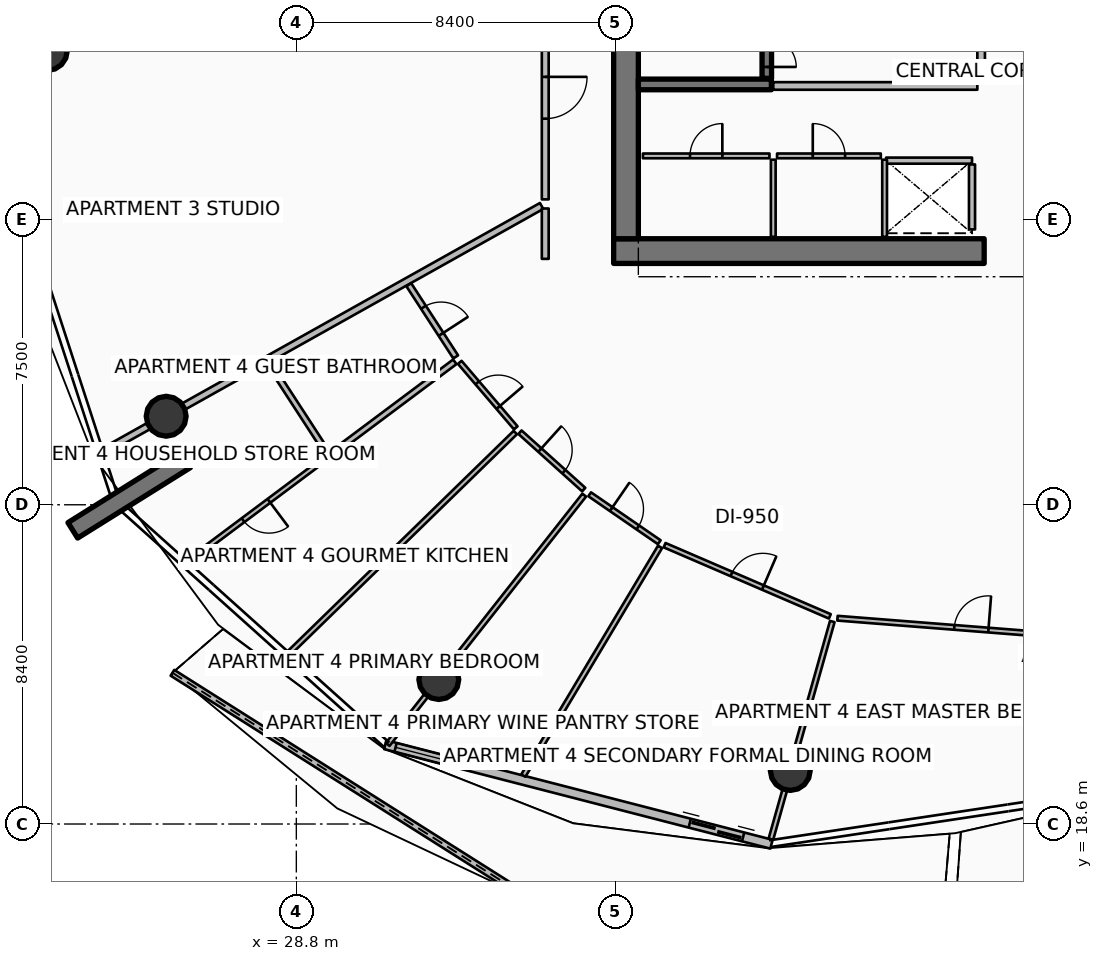
"""IFC4 building model, lengths in metres.
Left out: names, types, materials, properties, quantities, classifications, styles, units other than length and angle.
Written with IfcOpenShell. Run it as: python <this file> out.ifc"""

import sys

from ifc_helpers import new_model, si_unit, direction, frame, frame_2d, origin, origin_2d, place, context, subcontext, project, spatial, polyline, rectangle, circle, outline, extrude, element, fill, save


model = new_model("IFC4")
c1 = context("Model", 3, precision=1e-05, world=origin(), true_north=direction((0.0, 1.0)))
c2 = subcontext(c1, "Body", "Model", "MODEL_VIEW")
j1 = project(units=[si_unit("LENGTHUNIT", "METRE"), si_unit("PLANEANGLEUNIT", "RADIAN")], contexts=[c1])
p1 = place(None, origin())
s1 = spatial("IfcSite", under=j1, at=p1, CompositionType="ELEMENT")
p2 = place(p1, origin())
s2 = spatial("IfcBuilding", under=s1, at=p2, CompositionType="ELEMENT")
p3 = place(p2, frame((0.0, 0.0, 202.8)))
s3 = spatial("IfcBuildingStorey", under=s2, at=p3, CompositionType="ELEMENT", Elevation=202.8)
p4 = place(p3, frame((37.15, 33.675, 0.0), z_axis=(0.0, 0.0, 1.0), x_axis=(1.0, 0.0, 0.0)))
e1 = element("IfcWall", 1, at=p4, inside=s3, PredefinedType="SHEAR", context=c2, shape_type="SweptSolid", body=[
    extrude(rectangle(XDim=9.75, YDim=0.65, at=frame_2d((4.875, 0.0))), origin(), (0.0, 0.0, 1.0), 3.75),
])
p5 = place(p3, frame((37.475, 34.0, 0.0), z_axis=(0.0, 0.0, 1.0), x_axis=(0.0, 1.0, 0.0)))
e2 = element("IfcWall", 2, at=p5, inside=s3, PredefinedType="SHEAR", context=c2, shape_type="SweptSolid", body=[
    extrude(rectangle(XDim=16.0, YDim=0.65, at=frame_2d((8.0, 0.0))), origin(), (0.0, 0.0, 1.0), 3.75),
])
p6 = place(p3, frame((37.8, 38.06, 0.0), z_axis=(0.0, 0.0, 1.0), x_axis=(1.0, 0.0, 0.0)))
e3 = element("IfcWall", 3, at=p6, inside=s3, PredefinedType="SHEAR", context=c2, shape_type="SweptSolid", body=[
    extrude(rectangle(XDim=3.5, YDim=0.28, at=frame_2d((1.75, 0.0))), origin(), (0.0, 0.0, 1.0), 3.75),
])
p7 = place(p3, frame((25.886, 28.182, 0.0), z_axis=(0.0, 0.0, 1.0), x_axis=(-0.848033572426, -0.529942506352, 0.0)))
e4 = element("IfcWall", 4, at=p7, inside=s3, PredefinedType="SOLIDWALL", context=c2, shape_type="SweptSolid", body=[
    extrude(rectangle(XDim=3.5, YDim=0.48, at=frame_2d((1.75, 0.0))), origin(), (0.0, 0.0, 1.0), 3.75),
])
for number, where, z_axis, x_axis in (
    (5, (22.248, 38.952, 0.0), (0.0, 0.0, 1.0), (1.0, 0.0, 0.0)),
    (6, (25.375, 29.329, 0.0), (0.0, 0.0, 1.0), (1.0, 0.0, 0.0)),
    (7, (32.549, 22.401, 0.0), (0.0, 0.0, 1.0), (1.0, 0.0, 0.0)),
    (8, (41.798, 20.008, 0.0), (0.0, 0.0, 1.0), (1.0, 0.0, 0.0)),
):
    element("IfcColumn", number, at=place(p3, frame(where, z_axis=z_axis, x_axis=x_axis)), inside=s3, PredefinedType="COLUMN", context=c2, shape_type="SweptSolid", body=[
        extrude(circle(Radius=0.525, at=origin_2d()), origin(), (0.0, 0.0, 1.0), 3.5),
    ])
p8 = place(p3, frame((25.54, 22.579, 0.0), z_axis=(0.0, 0.0, 1.0), x_axis=(0.845278126761, -0.53432657469, 0.0)))
e9 = element("IfcWall", 9, at=p8, inside=s3, PredefinedType="PARAPET", context=c2, shape_type="SweptSolid", body=[
    extrude(outline(polyline([(0.0, 0.0), (11.123, 0.0), (11.123, 1.632), (5.562, 1.418), (0.0, 1.233), (0.0, 0.0)])), frame((0.0, 0.09, 0.0), z_axis=(0.0, -1.0, 0.0), x_axis=(1.0, 0.0, 0.0)), (0.0, 0.0, 1.0), 0.18),
])
p9 = place(p3, frame((46.097, 15.77, 0.0), z_axis=(0.0, 0.0, 1.0), x_axis=(0.962080224774, 0.272766642205, 0.0)))
e10 = element("IfcWall", 10, at=p9, inside=s3, PredefinedType="PARAPET", context=c2, shape_type="SweptSolid", body=[
    extrude(outline(polyline([(0.0, 0.0), (9.803, 0.0), (9.802, 1.632), (4.901, 1.798), (0.0, 1.86), (0.0, 0.0)])), frame((0.0, 0.09, 0.0), z_axis=(0.0, -1.0, 0.0), x_axis=(1.0, 0.0, 0.0)), (0.0, 0.0, 1.0), 0.18),
])
p10 = place(p3, frame((31.14, 20.687, 0.0), z_axis=(0.0, 0.0, 1.0), x_axis=(0.968374028006, -0.249502989727, 0.0)))
e11 = element("IfcWall", 11, at=p10, inside=s3, PredefinedType="SOLIDWALL", context=c2, shape_type="SweptSolid", body=[
    extrude(rectangle(XDim=10.494, YDim=0.24, at=frame_2d((5.247, 0.0))), origin(), (0.0, 0.0, 1.0), 2.45),
])
p11 = place(p10, frame((8.274, 0.0, 0.0)))
e12 = element("IfcOpeningElement", 12, at=p11, cuts=e11, PredefinedType="OPENING", context=c2, shape_type="SweptSolid", body=[
    extrude(rectangle(XDim=1.45, YDim=2.15, at=frame_2d((0.725, 1.075))), frame((0.0, 0.13, 0.0), z_axis=(0.0, -1.0, 0.0), x_axis=(1.0, 0.0, 0.0)), (0.0, 0.0, 1.0), 0.26),
])
p12 = place(p10, frame((0.28, 0.0, 0.65)))
e13 = element("IfcOpeningElement", 13, at=p12, cuts=e11, PredefinedType="OPENING", context=c2, shape_type="SweptSolid", body=[
    extrude(rectangle(XDim=1.6, YDim=1.5, at=frame_2d((0.8, 0.75))), frame((0.0, 0.13, 0.0), z_axis=(0.0, -1.0, 0.0), x_axis=(1.0, 0.0, 0.0)), (0.0, 0.0, 1.0), 0.26),
])
p13 = place(p3, frame((41.18, 38.22, 0.0), z_axis=(0.0, 0.0, 1.0), x_axis=(0.0, 1.0, 0.0)))
e14 = element("IfcWall", 14, at=p13, inside=s3, PredefinedType="SOLIDWALL", context=c2, shape_type="SweptSolid", body=[
    extrude(rectangle(XDim=7.56, YDim=0.25, at=frame_2d((3.78, 0.0))), origin(), (0.0, 0.0, 1.0), 3.5),
])
p14 = place(p13, frame((0.3, 0.0, 0.0)))
e15 = element("IfcOpeningElement", 15, at=p14, cuts=e14, PredefinedType="OPENING", context=c2, shape_type="SweptSolid", body=[
    extrude(rectangle(XDim=1.55, YDim=2.15, at=frame_2d((0.775, 1.075))), frame((0.0, 0.135, 0.0), z_axis=(0.0, -1.0, 0.0), x_axis=(1.0, 0.0, 0.0)), (0.0, 0.0, 1.0), 0.27),
])
p15 = place(p3, frame((44.32, 36.055, 0.0), z_axis=(0.0, 0.0, 1.0), x_axis=(1.0, 0.0, 0.0)))
e16 = element("IfcWall", 16, at=p15, inside=s3, PredefinedType="PARTITIONING", context=c2, shape_type="SweptSolid", body=[
    extrude(rectangle(XDim=2.26, YDim=0.16, at=frame_2d((1.13, 0.0))), origin(), (0.0, 0.0, 1.0), 3.5),
])
p16 = place(p3, frame((46.58, 34.245, 0.0), z_axis=(0.0, 0.0, 1.0), x_axis=(0.0, 1.0, 0.0)))
e17 = element("IfcWall", 17, at=p16, inside=s3, PredefinedType="PARTITIONING", context=c2, shape_type="SweptSolid", body=[
    extrude(rectangle(XDim=1.71, YDim=0.16, at=frame_2d((0.855, 0.0))), origin(), (0.0, 0.0, 1.0), 3.5),
])
for number, where, z_axis, x_axis in (
    (18, (44.28, 34.05, 0.0), (0.0, 0.0, 1.0), (0.0, 1.0, 0.0)),
    (19, (41.35, 34.05, 0.0), (0.0, 0.0, 1.0), (0.0, 1.0, 0.0)),
):
    element("IfcWall", number, at=place(p3, frame(where, z_axis=z_axis, x_axis=x_axis)), inside=s3, PredefinedType="PARTITIONING", context=c2, shape_type="SweptSolid", body=[
        extrude(rectangle(XDim=2.03, YDim=0.125, at=frame_2d((1.015, 0.0))), origin(), (0.0, 0.0, 1.0), 2.94),
    ])
p17 = place(p3, frame((37.92, 36.18, 0.0), z_axis=(0.0, 0.0, 1.0), x_axis=(1.0, 0.0, 0.0)))
e20 = element("IfcWall", 20, at=p17, inside=s3, PredefinedType="PARTITIONING", context=c2, shape_type="SweptSolid", body=[
    extrude(rectangle(XDim=3.33, YDim=0.125, at=frame_2d((1.665, 0.0))), origin(), (0.0, 0.0, 1.0), 2.94),
])
p18 = place(p17, frame((1.24, 0.0, 0.0)))
e21 = element("IfcOpeningElement", 21, at=p18, cuts=e20, PredefinedType="OPENING", context=c2, shape_type="SweptSolid", body=[
    extrude(rectangle(XDim=0.85, YDim=2.06, at=frame_2d((0.425, 1.03))), frame((0.0, 0.073, 0.0), z_axis=(0.0, -1.0, 0.0), x_axis=(1.0, 0.0, 0.0)), (0.0, 0.0, 1.0), 0.145),
])
p19 = place(p3, frame((41.45, 36.18, 0.0), z_axis=(0.0, 0.0, 1.0), x_axis=(1.0, 0.0, 0.0)))
e22 = element("IfcWall", 22, at=p19, inside=s3, PredefinedType="PARTITIONING", context=c2, shape_type="SweptSolid", body=[
    extrude(rectangle(XDim=2.73, YDim=0.125, at=frame_2d((1.365, 0.0))), origin(), (0.0, 0.0, 1.0), 2.94),
])
p20 = place(p19, frame((0.94, 0.0, 0.0)))
e23 = element("IfcOpeningElement", 23, at=p20, cuts=e22, PredefinedType="OPENING", context=c2, shape_type="SweptSolid", body=[
    extrude(rectangle(XDim=0.85, YDim=2.06, at=frame_2d((0.425, 1.03))), frame((0.0, 0.073, 0.0), z_axis=(0.0, -1.0, 0.0), x_axis=(1.0, 0.0, 0.0)), (0.0, 0.0, 1.0), 0.145),
])
p21 = place(p3, frame((41.35, 38.02, 0.0), z_axis=(0.0, 0.0, 1.0), x_axis=(1.0, 0.0, 0.0)))
e24 = element("IfcWall", 24, at=p21, inside=s3, PredefinedType="PARTITIONING", context=c2, shape_type="SweptSolid", body=[
    extrude(rectangle(XDim=5.37, YDim=0.2, at=frame_2d((2.685, 0.0))), origin(), (0.0, 0.0, 1.0), 3.5),
])
p22 = place(p3, frame((46.82, 38.12, 0.0), z_axis=(0.0, 0.0, 1.0), x_axis=(0.0, 1.0, 0.0)))
e25 = element("IfcWall", 25, at=p22, inside=s3, PredefinedType="PARTITIONING", context=c2, shape_type="SweptSolid", body=[
    extrude(rectangle(XDim=3.26, YDim=0.2, at=frame_2d((1.63, 0.0))), origin(), (0.0, 0.0, 1.0), 3.5),
])
p23 = place(p22, frame((1.105, 0.0, 0.0)))
e26 = element("IfcOpeningElement", 26, at=p23, cuts=e25, PredefinedType="OPENING", context=c2, shape_type="SweptSolid", body=[
    extrude(rectangle(XDim=1.05, YDim=2.1, at=frame_2d((0.525, 1.05))), frame((0.0, 0.11, 0.0), z_axis=(0.0, -1.0, 0.0), x_axis=(1.0, 0.0, 0.0)), (0.0, 0.0, 1.0), 0.22),
])
p24 = place(p3, frame((35.254, 34.862, 0.0), z_axis=(0.0, 0.0, 1.0), x_axis=(-0.872489721771, -0.488632464541, 0.0)))
e27 = element("IfcWall", 27, at=p24, inside=s3, PredefinedType="PARTITIONING", context=c2, shape_type="SweptSolid", body=[
    extrude(rectangle(XDim=13.286, YDim=0.18, at=frame_2d((6.643, 0.0))), origin(), (0.0, 0.0, 1.0), 2.94),
])
p25 = place(p3, frame((35.35, 40.383, 0.0), z_axis=(0.0, 0.0, 1.0), x_axis=(0.0, -1.0, 0.0)))
e28 = element("IfcWall", 28, at=p25, inside=s3, PredefinedType="PARTITIONING", context=c2, shape_type="SweptSolid", body=[
    extrude(rectangle(XDim=5.347, YDim=0.18, at=frame_2d((2.674, 0.0))), origin(), (0.0, 0.0, 1.0), 2.94),
])
p26 = place(p25, frame((2.124, 0.0, 0.0)))
e29 = element("IfcOpeningElement", 29, at=p26, cuts=e28, PredefinedType="OPENING", context=c2, shape_type="SweptSolid", body=[
    extrude(rectangle(XDim=1.1, YDim=2.1, at=frame_2d((0.55, 1.05))), frame((0.0, 0.1, 0.0), z_axis=(0.0, -1.0, 0.0), x_axis=(1.0, 0.0, 0.0)), (0.0, 0.0, 1.0), 0.2),
])
p27 = place(p3, frame((31.993, 40.105, 0.0), z_axis=(0.0, 0.0, 1.0), x_axis=(-0.993067142816, -0.117548500026, 0.0)))
e30 = element("IfcWall", 30, at=p27, inside=s3, PredefinedType="PARTITIONING", context=c2, shape_type="SweptSolid", body=[
    extrude(rectangle(XDim=11.776, YDim=0.125, at=frame_2d((5.888, 0.0))), origin(), (0.0, 0.0, 1.0), 2.94),
])
p28 = place(p3, frame((35.35, 34.796, 0.0), z_axis=(0.0, 0.0, 1.0), x_axis=(0.0, -1.0, 0.0)))
e31 = element("IfcWall", 31, at=p28, inside=s3, PredefinedType="PARTITIONING", context=c2, shape_type="SweptSolid", body=[
    extrude(rectangle(XDim=1.326, YDim=0.18, at=frame_2d((0.663, 0.0))), origin(), (0.0, 0.0, 1.0), 2.94),
])
p29 = place(p3, frame((31.759, 32.79, 0.0), z_axis=(0.0, 0.0, 1.0), x_axis=(0.544988350595, -0.838443616301, 0.0)))
e32 = element("IfcWall", 32, at=p29, inside=s3, PredefinedType="PARTITIONING", context=c2, shape_type="SweptSolid", body=[
    extrude(rectangle(XDim=2.265, YDim=0.15, at=frame_2d((1.133, 0.0))), origin(), (0.0, 0.0, 1.0), 2.94),
])
p30 = place(p29, frame((0.708, 0.0, 0.0)))
e33 = element("IfcOpeningElement", 33, at=p30, cuts=e32, PredefinedType="OPENING", context=c2, shape_type="SweptSolid", body=[
    extrude(rectangle(XDim=0.85, YDim=2.06, at=frame_2d((0.425, 1.03))), frame((0.0, 0.085, 0.0), z_axis=(0.0, -1.0, 0.0), x_axis=(1.0, 0.0, 0.0)), (0.0, 0.0, 1.0), 0.17),
])
p31 = place(p3, frame((28.077, 30.728, 0.0), z_axis=(0.0, 0.0, 1.0), x_axis=(0.544973135676, -0.838453505802, 0.0)))
e34 = element("IfcWall", 34, at=p31, inside=s3, PredefinedType="PARTITIONING", context=c2, shape_type="SweptSolid", body=[
    extrude(rectangle(XDim=2.82, YDim=0.15, at=frame_2d((1.41, 0.0))), origin(), (0.0, 0.0, 1.0), 2.94),
])
p32 = place(p3, frame((32.97, 30.761, 0.0), z_axis=(0.0, 0.0, 1.0), x_axis=(-0.800880183309, -0.598824625398, 0.0)))
e35 = element("IfcWall", 35, at=p32, inside=s3, PredefinedType="PARTITIONING", context=c2, shape_type="SweptSolid", body=[
    extrude(rectangle(XDim=4.09, YDim=0.15, at=frame_2d((2.045, 0.0))), origin(), (0.0, 0.0, 1.0), 2.94),
])
p33 = place(p3, frame((29.591, 28.234, 0.0), z_axis=(0.0, 0.0, 1.0), x_axis=(-0.80085424852, -0.598859309544, 0.0)))
e36 = element("IfcWall", 36, at=p33, inside=s3, PredefinedType="PARTITIONING", context=c2, shape_type="SweptSolid", body=[
    extrude(rectangle(XDim=4.625, YDim=0.125, at=frame_2d((2.313, 0.0))), origin(), (0.0, 0.0, 1.0), 2.94),
])
p34 = place(p33, frame((1.888, 0.0, 0.0)))
e37 = element("IfcOpeningElement", 37, at=p34, cuts=e36, PredefinedType="OPENING", context=c2, shape_type="SweptSolid", body=[
    extrude(rectangle(XDim=0.85, YDim=2.06, at=frame_2d((0.425, 1.03))), frame((0.0, 0.073, 0.0), z_axis=(0.0, -1.0, 0.0), x_axis=(1.0, 0.0, 0.0)), (0.0, 0.0, 1.0), 0.145),
])
p35 = place(p3, frame((34.562, 28.9, 0.0), z_axis=(0.0, 0.0, 1.0), x_axis=(-0.716077779963, -0.698020496148, 0.0)))
e38 = element("IfcWall", 38, at=p35, inside=s3, PredefinedType="PARTITIONING", context=c2, shape_type="SweptSolid", body=[
    extrude(rectangle(XDim=8.369, YDim=0.125, at=frame_2d((4.185, 0.0))), origin(), (0.0, 0.0, 1.0), 2.94),
])
p36 = place(p3, frame((33.101, 30.747, 0.0), z_axis=(0.0, 0.0, 1.0), x_axis=(0.649815270802, -0.760092174564, 0.0)))
e39 = element("IfcWall", 39, at=p36, inside=s3, PredefinedType="PARTITIONING", context=c2, shape_type="SweptSolid", body=[
    extrude(rectangle(XDim=2.267, YDim=0.125, at=frame_2d((1.134, 0.0))), origin(), (0.0, 0.0, 1.0), 2.94),
])
p37 = place(p36, frame((0.708, 0.0, 0.0)))
e40 = element("IfcOpeningElement", 40, at=p37, cuts=e39, PredefinedType="OPENING", context=c2, shape_type="SweptSolid", body=[
    extrude(rectangle(XDim=0.85, YDim=2.06, at=frame_2d((0.425, 1.03))), frame((0.0, 0.073, 0.0), z_axis=(0.0, -1.0, 0.0), x_axis=(1.0, 0.0, 0.0)), (0.0, 0.0, 1.0), 0.145),
])
p38 = place(p3, frame((34.685, 28.909, 0.0), z_axis=(0.0, 0.0, 1.0), x_axis=(0.74323497862, -0.669030467584, 0.0)))
e41 = element("IfcWall", 41, at=p38, inside=s3, PredefinedType="PARTITIONING", context=c2, shape_type="SweptSolid", body=[
    extrude(rectangle(XDim=2.257, YDim=0.125, at=frame_2d((1.128, 0.0))), origin(), (0.0, 0.0, 1.0), 2.94),
])
p39 = place(p38, frame((0.704, 0.0, 0.0)))
e42 = element("IfcOpeningElement", 42, at=p39, cuts=e41, PredefinedType="OPENING", context=c2, shape_type="SweptSolid", body=[
    extrude(rectangle(XDim=0.85, YDim=2.06, at=frame_2d((0.425, 1.03))), frame((0.0, 0.073, 0.0), z_axis=(0.0, -1.0, 0.0), x_axis=(1.0, 0.0, 0.0)), (0.0, 0.0, 1.0), 0.145),
])
p40 = place(p3, frame((36.375, 27.254, 0.0), z_axis=(0.0, 0.0, 1.0), x_axis=(-0.619083134383, -0.785325456561, 0.0)))
e43 = element("IfcWall", 43, at=p40, inside=s3, PredefinedType="PARTITIONING", context=c2, shape_type="SweptSolid", body=[
    extrude(rectangle(XDim=8.353, YDim=0.125, at=frame_2d((4.177, 0.0))), origin(), (0.0, 0.0, 1.0), 2.94),
])
p41 = place(p3, frame((38.371, 25.892, 0.0), z_axis=(0.0, 0.0, 1.0), x_axis=(-0.513096895206, -0.858330691593, 0.0)))
e44 = element("IfcWall", 44, at=p41, inside=s3, PredefinedType="PARTITIONING", context=c2, shape_type="SweptSolid", body=[
    extrude(rectangle(XDim=7.01, YDim=0.125, at=frame_2d((3.505, 0.0))), origin(), (0.0, 0.0, 1.0), 2.94),
])
p42 = place(p3, frame((36.52, 27.276, 0.0), z_axis=(0.0, 0.0, 1.0), x_axis=(0.823561163257, -0.567227476746, 0.0)))
e45 = element("IfcWall", 45, at=p42, inside=s3, PredefinedType="PARTITIONING", context=c2, shape_type="SweptSolid", body=[
    extrude(rectangle(XDim=2.224, YDim=0.125, at=frame_2d((1.112, 0.0))), origin(), (0.0, 0.0, 1.0), 2.94),
])
p43 = place(p42, frame((0.687, 0.0, 0.0)))
e46 = element("IfcOpeningElement", 46, at=p43, cuts=e45, PredefinedType="OPENING", context=c2, shape_type="SweptSolid", body=[
    extrude(rectangle(XDim=0.85, YDim=2.06, at=frame_2d((0.425, 1.03))), frame((0.0, 0.073, 0.0), z_axis=(0.0, -1.0, 0.0), x_axis=(1.0, 0.0, 0.0)), (0.0, 0.0, 1.0), 0.145),
])
p44 = place(p3, frame((38.49, 25.937, 0.0), z_axis=(0.0, 0.0, 1.0), x_axis=(0.91836706471, -0.39572962292, 0.0)))
e47 = element("IfcWall", 47, at=p44, inside=s3, PredefinedType="PARTITIONING", context=c2, shape_type="SweptSolid", body=[
    extrude(rectangle(XDim=4.734, YDim=0.125, at=frame_2d((2.367, 0.0))), origin(), (0.0, 0.0, 1.0), 2.94),
])
p45 = place(p44, frame((1.917, 0.0, 0.0)))
e48 = element("IfcOpeningElement", 48, at=p45, cuts=e47, PredefinedType="OPENING", context=c2, shape_type="SweptSolid", body=[
    extrude(rectangle(XDim=0.9, YDim=2.08, at=frame_2d((0.45, 1.04))), frame((0.0, 0.073, 0.0), z_axis=(0.0, -1.0, 0.0), x_axis=(1.0, 0.0, 0.0)), (0.0, 0.0, 1.0), 0.145),
])
p46 = place(p3, frame((42.903, 23.928, 0.0), z_axis=(0.0, 0.0, 1.0), x_axis=(-0.2714679616, -0.962447476917, 0.0)))
e49 = element("IfcWall", 49, at=p46, inside=s3, PredefinedType="PARTITIONING", context=c2, shape_type="SweptSolid", body=[
    extrude(rectangle(XDim=5.95, YDim=0.125, at=frame_2d((2.975, 0.0))), origin(), (0.0, 0.0, 1.0), 2.94),
])
p47 = place(p3, frame((43.04, 24.016, 0.0), z_axis=(0.0, 0.0, 1.0), x_axis=(0.996917803484, -0.078453126749, 0.0)))
e50 = element("IfcWall", 50, at=p47, inside=s3, PredefinedType="PARTITIONING", context=c2, shape_type="SweptSolid", body=[
    extrude(rectangle(XDim=7.067, YDim=0.125, at=frame_2d((3.534, 0.0))), origin(), (0.0, 0.0, 1.0), 2.94),
])
p48 = place(p47, frame((3.083, 0.0, 0.0)))
e51 = element("IfcOpeningElement", 51, at=p48, cuts=e50, PredefinedType="OPENING", context=c2, shape_type="SweptSolid", body=[
    extrude(rectangle(XDim=0.9, YDim=2.08, at=frame_2d((0.45, 1.04))), frame((0.0, 0.073, 0.0), z_axis=(0.0, -1.0, 0.0), x_axis=(1.0, 0.0, 0.0)), (0.0, 0.0, 1.0), 0.145),
])
p49 = place(p11, origin())
e52 = element("IfcDoor", 52, at=p49, inside=s3, OperationType="DOUBLE_DOOR_SLIDING", PredefinedType="DOOR", context=c2, shape_type="SweptSolid", body=[
    extrude(rectangle(XDim=1.45, YDim=2.15, at=frame_2d((0.725, 1.075))), frame((0.0, 0.025, 0.0), z_axis=(0.0, -1.0, 0.0), x_axis=(1.0, 0.0, 0.0)), (0.0, 0.0, 1.0), 0.05),
])
fill(e12, e52)
p50 = place(p12, origin())
e53 = element("IfcWindow", 53, at=p50, inside=s3, PartitioningType="SINGLE_PANEL", PredefinedType="WINDOW", context=c2, shape_type="SweptSolid", body=[
    extrude(rectangle(XDim=1.6, YDim=1.5, at=frame_2d((0.8, 0.75))), frame((0.0, 0.03, 0.0), z_axis=(0.0, -1.0, 0.0), x_axis=(1.0, 0.0, 0.0)), (0.0, 0.0, 1.0), 0.06),
])
fill(e13, e53)
p51 = place(p14, origin())
e54 = element("IfcDoor", 54, at=p51, inside=s3, OperationType="DOUBLE_DOOR_SINGLE_SWING", PredefinedType="DOOR", context=c2, shape_type="SweptSolid", body=[
    extrude(rectangle(XDim=1.55, YDim=2.15, at=frame_2d((0.775, 1.075))), frame((0.0, 0.025, 0.0), z_axis=(0.0, -1.0, 0.0), x_axis=(1.0, 0.0, 0.0)), (0.0, 0.0, 1.0), 0.05),
])
fill(e15, e54)
p52 = place(p18, origin())
e55 = element("IfcDoor", 55, at=p52, inside=s3, OperationType="SINGLE_SWING_RIGHT", PredefinedType="DOOR", context=c2, shape_type="SweptSolid", body=[
    extrude(rectangle(XDim=0.85, YDim=2.06, at=frame_2d((0.425, 1.03))), frame((0.0, 0.025, 0.0), z_axis=(0.0, -1.0, 0.0), x_axis=(1.0, 0.0, 0.0)), (0.0, 0.0, 1.0), 0.05),
])
fill(e21, e55)
p53 = place(p20, origin())
e56 = element("IfcDoor", 56, at=p53, inside=s3, OperationType="SINGLE_SWING_LEFT", PredefinedType="DOOR", context=c2, shape_type="SweptSolid", body=[
    extrude(rectangle(XDim=0.85, YDim=2.06, at=frame_2d((0.425, 1.03))), frame((0.0, 0.025, 0.0), z_axis=(0.0, -1.0, 0.0), x_axis=(1.0, 0.0, 0.0)), (0.0, 0.0, 1.0), 0.05),
])
fill(e23, e56)
p54 = place(p26, origin())
e57 = element("IfcDoor", 57, at=p54, inside=s3, OperationType="SINGLE_SWING_LEFT", PredefinedType="DOOR", context=c2, shape_type="SweptSolid", body=[
    extrude(rectangle(XDim=1.1, YDim=2.1, at=frame_2d((0.55, 1.05))), frame((0.0, 0.025, 0.0), z_axis=(0.0, -1.0, 0.0), x_axis=(1.0, 0.0, 0.0)), (0.0, 0.0, 1.0), 0.05),
])
fill(e29, e57)
p55 = place(p30, origin())
e58 = element("IfcDoor", 58, at=p55, inside=s3, OperationType="SINGLE_SWING_RIGHT", PredefinedType="DOOR", context=c2, shape_type="SweptSolid", body=[
    extrude(rectangle(XDim=0.85, YDim=2.06, at=frame_2d((0.425, 1.03))), frame((0.0, 0.025, 0.0), z_axis=(0.0, -1.0, 0.0), x_axis=(1.0, 0.0, 0.0)), (0.0, 0.0, 1.0), 0.05),
])
fill(e33, e58)
p56 = place(p34, origin())
e59 = element("IfcDoor", 59, at=p56, inside=s3, OperationType="SINGLE_SWING_LEFT", PredefinedType="DOOR", context=c2, shape_type="SweptSolid", body=[
    extrude(rectangle(XDim=0.85, YDim=2.06, at=frame_2d((0.425, 1.03))), frame((0.0, 0.025, 0.0), z_axis=(0.0, -1.0, 0.0), x_axis=(1.0, 0.0, 0.0)), (0.0, 0.0, 1.0), 0.05),
])
fill(e37, e59)
p57 = place(p37, origin())
e60 = element("IfcDoor", 60, at=p57, inside=s3, OperationType="SINGLE_SWING_RIGHT", PredefinedType="DOOR", context=c2, shape_type="SweptSolid", body=[
    extrude(rectangle(XDim=0.85, YDim=2.06, at=frame_2d((0.425, 1.03))), frame((0.0, 0.025, 0.0), z_axis=(0.0, -1.0, 0.0), x_axis=(1.0, 0.0, 0.0)), (0.0, 0.0, 1.0), 0.05),
])
fill(e40, e60)
p58 = place(p39, origin())
e61 = element("IfcDoor", 61, at=p58, inside=s3, OperationType="SINGLE_SWING_LEFT", PredefinedType="DOOR", context=c2, shape_type="SweptSolid", body=[
    extrude(rectangle(XDim=0.85, YDim=2.06, at=frame_2d((0.425, 1.03))), frame((0.0, 0.025, 0.0), z_axis=(0.0, -1.0, 0.0), x_axis=(1.0, 0.0, 0.0)), (0.0, 0.0, 1.0), 0.05),
])
fill(e42, e61)
p59 = place(p43, origin())
e62 = element("IfcDoor", 62, at=p59, inside=s3, OperationType="SINGLE_SWING_LEFT", PredefinedType="DOOR", context=c2, shape_type="SweptSolid", body=[
    extrude(rectangle(XDim=0.85, YDim=2.06, at=frame_2d((0.425, 1.03))), frame((0.0, 0.025, 0.0), z_axis=(0.0, -1.0, 0.0), x_axis=(1.0, 0.0, 0.0)), (0.0, 0.0, 1.0), 0.05),
])
fill(e46, e62)
p60 = place(p45, origin())
e63 = element("IfcDoor", 63, at=p60, inside=s3, OperationType="SINGLE_SWING_RIGHT", PredefinedType="DOOR", context=c2, shape_type="SweptSolid", body=[
    extrude(rectangle(XDim=0.9, YDim=2.08, at=frame_2d((0.45, 1.04))), frame((0.0, 0.025, 0.0), z_axis=(0.0, -1.0, 0.0), x_axis=(1.0, 0.0, 0.0)), (0.0, 0.0, 1.0), 0.05),
])
fill(e48, e63)
p61 = place(p48, origin())
e64 = element("IfcDoor", 64, at=p61, inside=s3, OperationType="SINGLE_SWING_RIGHT", PredefinedType="DOOR", context=c2, shape_type="SweptSolid", body=[
    extrude(rectangle(XDim=0.9, YDim=2.08, at=frame_2d((0.45, 1.04))), frame((0.0, 0.025, 0.0), z_axis=(0.0, -1.0, 0.0), x_axis=(1.0, 0.0, 0.0)), (0.0, 0.0, 1.0), 0.05),
])
fill(e51, e64)
save(model, sys.argv[1])
